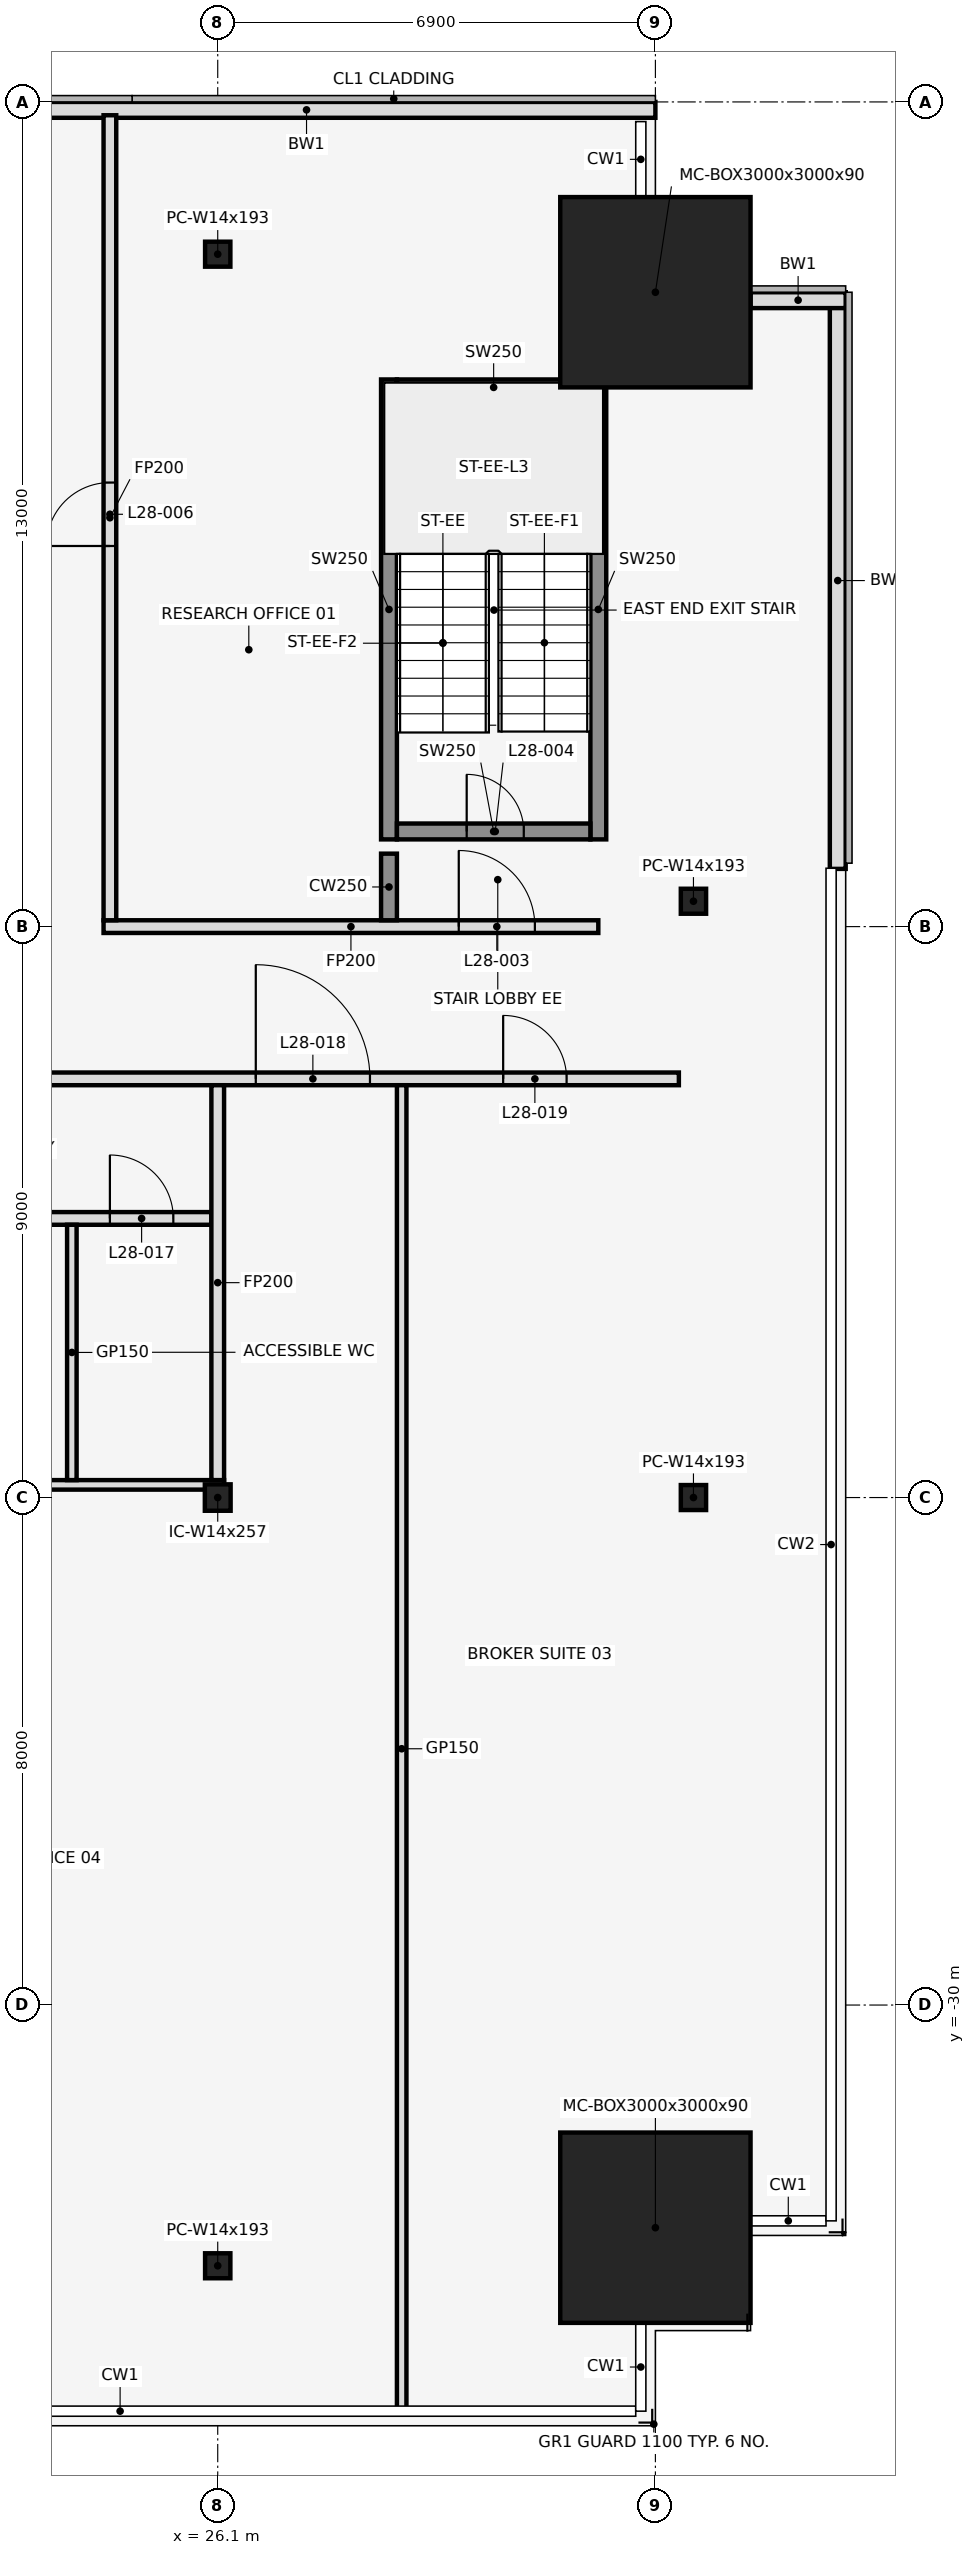
"""IFC4 building model, lengths in metres.
Left out: names, types, materials, properties, quantities, classifications, styles, units other than length and angle.
Written with IfcOpenShell. Run it as: python <this file> out.ifc"""

import sys

from ifc_helpers import new_model, si_unit, direction, frame, frame_2d, origin, origin_2d, place, context, subcontext, project, spatial, rectangle, hollow_rectangle, i_section, extrude, element, fill, save


model = new_model("IFC4")
c1 = context("Model", 3, precision=1e-05, world=origin(), true_north=direction((0.0, 1.0)))
c2 = subcontext(c1, "Body", "Model", "MODEL_VIEW")
j1 = project(units=[si_unit("LENGTHUNIT", "METRE"), si_unit("PLANEANGLEUNIT", "RADIAN")], contexts=[c1])
p1 = place(None, origin())
s1 = spatial("IfcSite", under=j1, at=p1, CompositionType="ELEMENT")
p2 = place(p1, origin())
s2 = spatial("IfcBuilding", under=s1, at=p2, CompositionType="ELEMENT")
p3 = place(p2, frame((0.0, 0.0, 130.9)))
s3 = spatial("IfcBuildingStorey", under=s2, at=p3, CompositionType="ELEMENT", Elevation=130.9)
for number, where, z_axis, x_axis in (
    (1, (26.1, -34.11, 0.0), (0.0, 0.0, 1.0), (1.0, 0.0, 0.0)),
    (2, (26.1, -2.4, 0.0), (0.0, 0.0, 1.0), (1.0, 0.0, 0.0)),
):
    element("IfcColumn", number, at=place(p3, frame(where, z_axis=z_axis, x_axis=x_axis)), inside=s3, PredefinedType="COLUMN", context=c2, shape_type="SweptSolid", body=[
        extrude(i_section(OverallWidth=0.399, OverallDepth=0.394, WebThickness=0.023, FlangeThickness=0.037, at=origin_2d()), origin(), (0.0, 0.0, 1.0), 4.1),
    ])
for number, where, z_axis, x_axis in (
    (3, (33.0, -33.51, 0.0), (0.0, 0.0, 1.0), (1.0, 0.0, 0.0)),
    (4, (33.0, -3.0, 0.0), (0.0, 0.0, 1.0), (1.0, 0.0, 0.0)),
):
    element("IfcColumn", number, at=place(p3, frame(where, z_axis=z_axis, x_axis=x_axis)), inside=s3, PredefinedType="COLUMN", context=c2, shape_type="SweptSolid", body=[
        extrude(hollow_rectangle(XDim=3.0, YDim=3.0, WallThickness=0.09, at=origin_2d()), origin(), (0.0, 0.0, 1.0), 4.1),
    ])
for number, where, z_axis, x_axis in (
    (5, (33.6, -12.6, 0.0), (0.0, 0.0, 1.0), (1.0, 0.0, 0.0)),
    (6, (33.6, -22.0, 0.0), (0.0, 0.0, 1.0), (1.0, 0.0, 0.0)),
):
    element("IfcColumn", number, at=place(p3, frame(where, z_axis=z_axis, x_axis=x_axis)), inside=s3, PredefinedType="COLUMN", context=c2, shape_type="SweptSolid", body=[
        extrude(i_section(OverallWidth=0.399, OverallDepth=0.394, WebThickness=0.023, FlangeThickness=0.037, at=origin_2d()), origin(), (0.0, 0.0, 1.0), 4.1),
    ])
p4 = place(p3, frame((26.1, -22.0, 0.0), z_axis=(0.0, 0.0, 1.0), x_axis=(1.0, 0.0, 0.0)))
e7 = element("IfcColumn", 7, at=p4, inside=s3, PredefinedType="COLUMN", context=c2, shape_type="SweptSolid", body=[
    extrude(i_section(OverallWidth=0.406, OverallDepth=0.417, WebThickness=0.03, FlangeThickness=0.048, at=origin_2d()), origin(), (0.0, 0.0, 1.0), 4.1),
])
p5 = place(p3, frame((33.0, -0.125, 0.0), z_axis=(0.0, 0.0, 1.0), x_axis=(-1.0, 0.0, 0.0)))
e8 = element("IfcWall", 8, at=p5, inside=s3, PredefinedType="STANDARD", context=c2, shape_type="SweptSolid", body=[
    extrude(rectangle(XDim=11.0, YDim=0.25, at=frame_2d((5.5, 0.0))), origin(), (0.0, 0.0, 1.0), 3.9),
])
p6 = place(p3, frame((35.875, -12.09, 0.0), z_axis=(0.0, 0.0, 1.0), x_axis=(0.0, 1.0, 0.0)))
e9 = element("IfcWall", 9, at=p6, inside=s3, PredefinedType="STANDARD", context=c2, shape_type="SweptSolid", body=[
    extrude(rectangle(XDim=9.09, YDim=0.25, at=frame_2d((4.545, 0.0))), origin(), (0.0, 0.0, 1.0), 3.9),
])
p7 = place(p3, frame((36.0, -3.125, 0.0), z_axis=(0.0, 0.0, 1.0), x_axis=(-1.0, 0.0, 0.0)))
e10 = element("IfcWall", 10, at=p7, inside=s3, PredefinedType="STANDARD", context=c2, shape_type="SweptSolid", body=[
    extrude(rectangle(XDim=1.5, YDim=0.25, at=frame_2d((0.75, 0.0))), origin(), (0.0, 0.0, 1.0), 3.9),
])
for number, where, z_axis, x_axis in (
    (11, (28.8, -11.625, 0.0), (0.0, 0.0, 1.0), (0.0, 1.0, 0.0)),
    (12, (32.1, -11.625, 0.0), (0.0, 0.0, 1.0), (0.0, 1.0, 0.0)),
):
    element("IfcWall", number, at=place(p3, frame(where, z_axis=z_axis, x_axis=x_axis)), inside=s3, PredefinedType="SHEAR", context=c2, shape_type="SweptSolid", body=[
        extrude(rectangle(XDim=7.25, YDim=0.25, at=frame_2d((3.625, 0.0))), origin(), (0.0, 0.0, 1.0), 4.1),
    ])
p8 = place(p3, frame((28.925, -11.5, 0.0), z_axis=(0.0, 0.0, 1.0), x_axis=(1.0, 0.0, 0.0)))
e13 = element("IfcWall", 13, at=p8, inside=s3, PredefinedType="SHEAR", context=c2, shape_type="SweptSolid", body=[
    extrude(rectangle(XDim=3.05, YDim=0.25, at=frame_2d((1.525, 0.0))), origin(), (0.0, 0.0, 1.0), 4.1),
])
p9 = place(p8, frame((1.1, 0.0, 0.0)))
e14 = element("IfcOpeningElement", 14, at=p9, cuts=e13, PredefinedType="OPENING", context=c2, shape_type="SweptSolid", body=[
    extrude(rectangle(XDim=0.9, YDim=2.1, at=frame_2d((0.45, 1.05))), frame((0.0, 0.137, 0.0), z_axis=(0.0, -1.0, 0.0), x_axis=(1.0, 0.0, 0.0)), (0.0, 0.0, 1.0), 0.274),
])
p10 = place(p3, frame((28.925, -4.5, 0.0), z_axis=(0.0, 0.0, 1.0), x_axis=(1.0, 0.0, 0.0)))
e15 = element("IfcWall", 15, at=p10, inside=s3, PredefinedType="SHEAR", context=c2, shape_type="SweptSolid", body=[
    extrude(rectangle(XDim=3.05, YDim=0.25, at=frame_2d((1.525, 0.0))), origin(), (0.0, 0.0, 1.0), 4.1),
])
p11 = place(p3, frame((17.5, -21.8, 0.0), z_axis=(0.0, 0.0, 1.0), x_axis=(1.0, 0.0, 0.0)))
e16 = element("IfcWall", 16, at=p11, inside=s3, PredefinedType="PARTITIONING", context=c2, shape_type="SweptSolid", body=[
    extrude(rectangle(XDim=8.7, YDim=0.15, at=frame_2d((4.35, 0.0))), origin(), (0.0, 0.0, 1.0), 2.968),
])
p12 = place(p3, frame((17.5, -17.6, 0.0), z_axis=(0.0, 0.0, 1.0), x_axis=(1.0, 0.0, 0.0)))
e17 = element("IfcWall", 17, at=p12, inside=s3, PredefinedType="PARTITIONING", context=c2, shape_type="SweptSolid", body=[
    extrude(rectangle(XDim=8.5, YDim=0.2, at=frame_2d((4.25, 0.0))), origin(), (0.0, 0.0, 1.0), 2.968),
])
p13 = place(p12, frame((1.1, 0.0, 0.0)))
e18 = element("IfcOpeningElement", 18, at=p13, cuts=e17, PredefinedType="OPENING", context=c2, shape_type="SweptSolid", body=[
    extrude(rectangle(XDim=0.9, YDim=2.1, at=frame_2d((0.45, 1.05))), frame((0.0, 0.112, 0.0), z_axis=(0.0, -1.0, 0.0), x_axis=(1.0, 0.0, 0.0)), (0.0, 0.0, 1.0), 0.224),
])
p14 = place(p12, frame((4.3, 0.0, 0.0)))
e19 = element("IfcOpeningElement", 19, at=p14, cuts=e17, PredefinedType="OPENING", context=c2, shape_type="SweptSolid", body=[
    extrude(rectangle(XDim=0.9, YDim=2.1, at=frame_2d((0.45, 1.05))), frame((0.0, 0.112, 0.0), z_axis=(0.0, -1.0, 0.0), x_axis=(1.0, 0.0, 0.0)), (0.0, 0.0, 1.0), 0.224),
])
p15 = place(p12, frame((6.9, 0.0, 0.0)))
e20 = element("IfcOpeningElement", 20, at=p15, cuts=e17, PredefinedType="OPENING", context=c2, shape_type="SweptSolid", body=[
    extrude(rectangle(XDim=1.0, YDim=2.1, at=frame_2d((0.5, 1.05))), frame((0.0, 0.112, 0.0), z_axis=(0.0, -1.0, 0.0), x_axis=(1.0, 0.0, 0.0)), (0.0, 0.0, 1.0), 0.224),
])
p16 = place(p3, frame((-33.37, -15.4, 0.0), z_axis=(0.0, 0.0, 1.0), x_axis=(1.0, 0.0, 0.0)))
e21 = element("IfcWall", 21, at=p16, inside=s3, PredefinedType="PARTITIONING", context=c2, shape_type="SweptSolid", body=[
    extrude(rectangle(XDim=66.74, YDim=0.2, at=frame_2d((33.37, 0.0))), origin(), (0.0, 0.0, 1.0), 2.968),
])
p17 = place(p16, frame((1.7, 0.0, 0.0)))
e22 = element("IfcOpeningElement", 22, at=p17, cuts=e21, PredefinedType="OPENING", context=c2, shape_type="SweptSolid", body=[
    extrude(rectangle(XDim=1.0, YDim=2.1, at=frame_2d((0.5, 1.05))), frame((0.0, 0.112, 0.0), z_axis=(0.0, -1.0, 0.0), x_axis=(1.0, 0.0, 0.0)), (0.0, 0.0, 1.0), 0.224),
])
p18 = place(p16, frame((7.87, 0.0, 0.0)))
e23 = element("IfcOpeningElement", 23, at=p18, cuts=e21, PredefinedType="OPENING", context=c2, shape_type="SweptSolid", body=[
    extrude(rectangle(XDim=1.8, YDim=2.1, at=frame_2d((0.9, 1.05))), frame((0.0, 0.112, 0.0), z_axis=(0.0, -1.0, 0.0), x_axis=(1.0, 0.0, 0.0)), (0.0, 0.0, 1.0), 0.224),
])
p19 = place(p16, frame((15.07, 0.0, 0.0)))
e24 = element("IfcOpeningElement", 24, at=p19, cuts=e21, PredefinedType="OPENING", context=c2, shape_type="SweptSolid", body=[
    extrude(rectangle(XDim=1.8, YDim=2.1, at=frame_2d((0.9, 1.05))), frame((0.0, 0.112, 0.0), z_axis=(0.0, -1.0, 0.0), x_axis=(1.0, 0.0, 0.0)), (0.0, 0.0, 1.0), 0.224),
])
p20 = place(p16, frame((22.27, 0.0, 0.0)))
e25 = element("IfcOpeningElement", 25, at=p20, cuts=e21, PredefinedType="OPENING", context=c2, shape_type="SweptSolid", body=[
    extrude(rectangle(XDim=1.8, YDim=2.1, at=frame_2d((0.9, 1.05))), frame((0.0, 0.112, 0.0), z_axis=(0.0, -1.0, 0.0), x_axis=(1.0, 0.0, 0.0)), (0.0, 0.0, 1.0), 0.224),
])
p21 = place(p16, frame((30.97, 0.0, 0.0)))
e26 = element("IfcOpeningElement", 26, at=p21, cuts=e21, PredefinedType="OPENING", context=c2, shape_type="SweptSolid", body=[
    extrude(rectangle(XDim=1.8, YDim=2.1, at=frame_2d((0.9, 1.05))), frame((0.0, 0.112, 0.0), z_axis=(0.0, -1.0, 0.0), x_axis=(1.0, 0.0, 0.0)), (0.0, 0.0, 1.0), 0.224),
])
p22 = place(p16, frame((39.67, 0.0, 0.0)))
e27 = element("IfcOpeningElement", 27, at=p22, cuts=e21, PredefinedType="OPENING", context=c2, shape_type="SweptSolid", body=[
    extrude(rectangle(XDim=1.8, YDim=2.1, at=frame_2d((0.9, 1.05))), frame((0.0, 0.112, 0.0), z_axis=(0.0, -1.0, 0.0), x_axis=(1.0, 0.0, 0.0)), (0.0, 0.0, 1.0), 0.224),
])
p23 = place(p16, frame((46.97, 0.0, 0.0)))
e28 = element("IfcOpeningElement", 28, at=p23, cuts=e21, PredefinedType="OPENING", context=c2, shape_type="SweptSolid", body=[
    extrude(rectangle(XDim=1.8, YDim=2.1, at=frame_2d((0.9, 1.05))), frame((0.0, 0.112, 0.0), z_axis=(0.0, -1.0, 0.0), x_axis=(1.0, 0.0, 0.0)), (0.0, 0.0, 1.0), 0.224),
])
p24 = place(p16, frame((54.67, 0.0, 0.0)))
e29 = element("IfcOpeningElement", 29, at=p24, cuts=e21, PredefinedType="OPENING", context=c2, shape_type="SweptSolid", body=[
    extrude(rectangle(XDim=0.9, YDim=2.1, at=frame_2d((0.45, 1.05))), frame((0.0, 0.112, 0.0), z_axis=(0.0, -1.0, 0.0), x_axis=(1.0, 0.0, 0.0)), (0.0, 0.0, 1.0), 0.224),
])
p25 = place(p16, frame((60.07, 0.0, 0.0)))
e30 = element("IfcOpeningElement", 30, at=p25, cuts=e21, PredefinedType="OPENING", context=c2, shape_type="SweptSolid", body=[
    extrude(rectangle(XDim=1.8, YDim=2.1, at=frame_2d((0.9, 1.05))), frame((0.0, 0.112, 0.0), z_axis=(0.0, -1.0, 0.0), x_axis=(1.0, 0.0, 0.0)), (0.0, 0.0, 1.0), 0.224),
])
p26 = place(p16, frame((63.97, 0.0, 0.0)))
e31 = element("IfcOpeningElement", 31, at=p26, cuts=e21, PredefinedType="OPENING", context=c2, shape_type="SweptSolid", body=[
    extrude(rectangle(XDim=1.0, YDim=2.1, at=frame_2d((0.5, 1.05))), frame((0.0, 0.112, 0.0), z_axis=(0.0, -1.0, 0.0), x_axis=(1.0, 0.0, 0.0)), (0.0, 0.0, 1.0), 0.224),
])
p27 = place(p3, frame((24.3, -13.0, 0.0), z_axis=(0.0, 0.0, 1.0), x_axis=(1.0, 0.0, 0.0)))
e32 = element("IfcWall", 32, at=p27, inside=s3, PredefinedType="PARTITIONING", context=c2, shape_type="SweptSolid", body=[
    extrude(rectangle(XDim=7.8, YDim=0.2, at=frame_2d((3.9, 0.0))), origin(), (0.0, 0.0, 1.0), 2.968),
])
p28 = place(p27, frame((5.6, 0.0, 0.0)))
e33 = element("IfcOpeningElement", 33, at=p28, cuts=e32, PredefinedType="OPENING", context=c2, shape_type="SweptSolid", body=[
    extrude(rectangle(XDim=1.2, YDim=2.1, at=frame_2d((0.6, 1.05))), frame((0.0, 0.112, 0.0), z_axis=(0.0, -1.0, 0.0), x_axis=(1.0, 0.0, 0.0)), (0.0, 0.0, 1.0), 0.224),
])
p29 = place(p3, frame((23.8, -21.725, 0.0), z_axis=(0.0, 0.0, 1.0), x_axis=(0.0, 1.0, 0.0)))
e34 = element("IfcWall", 34, at=p29, inside=s3, PredefinedType="PARTITIONING", context=c2, shape_type="SweptSolid", body=[
    extrude(rectangle(XDim=4.025, YDim=0.15, at=frame_2d((2.013, 0.0))), origin(), (0.0, 0.0, 1.0), 2.968),
])
p30 = place(p3, frame((24.4, -12.9, 0.0), z_axis=(0.0, 0.0, 1.0), x_axis=(0.0, 1.0, 0.0)))
e35 = element("IfcWall", 35, at=p30, inside=s3, PredefinedType="PARTITIONING", context=c2, shape_type="SweptSolid", body=[
    extrude(rectangle(XDim=12.69, YDim=0.2, at=frame_2d((6.345, 0.0))), origin(), (0.0, 0.0, 1.0), 2.968),
])
p31 = place(p30, frame((5.9, 0.0, 0.0)))
e36 = element("IfcOpeningElement", 36, at=p31, cuts=e35, PredefinedType="OPENING", context=c2, shape_type="SweptSolid", body=[
    extrude(rectangle(XDim=1.0, YDim=2.1, at=frame_2d((0.5, 1.05))), frame((0.0, 0.112, 0.0), z_axis=(0.0, -1.0, 0.0), x_axis=(1.0, 0.0, 0.0)), (0.0, 0.0, 1.0), 0.224),
])
p32 = place(p3, frame((26.1, -21.725, 0.0), z_axis=(0.0, 0.0, 1.0), x_axis=(0.0, 1.0, 0.0)))
e37 = element("IfcWall", 37, at=p32, inside=s3, PredefinedType="PARTITIONING", context=c2, shape_type="SweptSolid", body=[
    extrude(rectangle(XDim=6.225, YDim=0.2, at=frame_2d((3.113, 0.0))), origin(), (0.0, 0.0, 1.0), 2.968),
])
p33 = place(p3, frame((28.8, -12.9, 0.0), z_axis=(0.0, 0.0, 1.0), x_axis=(0.0, 1.0, 0.0)))
e38 = element("IfcWall", 38, at=p33, inside=s3, PredefinedType="SHEAR", context=c2, shape_type="SweptSolid", body=[
    extrude(rectangle(XDim=1.05, YDim=0.25, at=frame_2d((0.525, 0.0))), origin(), (0.0, 0.0, 1.0), 4.1),
])
p34 = place(p3, frame((29.0, -36.42, 0.0), z_axis=(0.0, 0.0, 1.0), x_axis=(0.0, 1.0, 0.0)))
e39 = element("IfcWall", 39, at=p34, inside=s3, PredefinedType="PARTITIONING", context=c2, shape_type="SweptSolid", body=[
    extrude(rectangle(XDim=20.92, YDim=0.15, at=frame_2d((10.46, 0.0))), origin(), (0.0, 0.0, 1.0), 2.968),
])
p35 = place(p28, origin())
e40 = element("IfcDoor", 40, at=p35, inside=s3, OperationType="SINGLE_SWING_RIGHT", PredefinedType="DOOR", context=c2, shape_type="SweptSolid", body=[
    extrude(rectangle(XDim=1.2, YDim=2.1, at=frame_2d((0.6, 1.05))), frame((0.0, 0.025, 0.0), z_axis=(0.0, -1.0, 0.0), x_axis=(1.0, 0.0, 0.0)), (0.0, 0.0, 1.0), 0.05),
])
fill(e33, e40)
p36 = place(p9, origin())
e41 = element("IfcDoor", 41, at=p36, inside=s3, OperationType="SINGLE_SWING_LEFT", PredefinedType="DOOR", context=c2, shape_type="SweptSolid", body=[
    extrude(rectangle(XDim=0.9, YDim=2.1, at=frame_2d((0.45, 1.05))), frame((0.0, 0.025, 0.0), z_axis=(0.0, -1.0, 0.0), x_axis=(1.0, 0.0, 0.0)), (0.0, 0.0, 1.0), 0.05),
])
fill(e14, e41)
p37 = place(p31, frame((1.0, 0.0, 0.0), z_axis=(0.0, 0.0, 1.0), x_axis=(-1.0, 0.0, 0.0)))
e42 = element("IfcDoor", 42, at=p37, inside=s3, OperationType="SINGLE_SWING_RIGHT", PredefinedType="DOOR", context=c2, shape_type="SweptSolid", body=[
    extrude(rectangle(XDim=1.0, YDim=2.1, at=frame_2d((0.5, 1.05))), frame((0.0, 0.025, 0.0), z_axis=(0.0, -1.0, 0.0), x_axis=(1.0, 0.0, 0.0)), (0.0, 0.0, 1.0), 0.05),
])
fill(e36, e42)
p38 = place(p15, frame((1.0, 0.0, 0.0), z_axis=(0.0, 0.0, 1.0), x_axis=(-1.0, 0.0, 0.0)))
e43 = element("IfcDoor", 43, at=p38, inside=s3, OperationType="SINGLE_SWING_RIGHT", PredefinedType="DOOR", context=c2, shape_type="SweptSolid", body=[
    extrude(rectangle(XDim=1.0, YDim=2.1, at=frame_2d((0.5, 1.05))), frame((0.0, 0.025, 0.0), z_axis=(0.0, -1.0, 0.0), x_axis=(1.0, 0.0, 0.0)), (0.0, 0.0, 1.0), 0.05),
])
fill(e20, e43)
p39 = place(p25, origin())
e44 = element("IfcDoor", 44, at=p39, inside=s3, OperationType="SINGLE_SWING_LEFT", PredefinedType="DOOR", context=c2, shape_type="SweptSolid", body=[
    extrude(rectangle(XDim=1.8, YDim=2.1, at=frame_2d((0.9, 1.05))), frame((0.0, 0.025, 0.0), z_axis=(0.0, -1.0, 0.0), x_axis=(1.0, 0.0, 0.0)), (0.0, 0.0, 1.0), 0.05),
])
fill(e30, e44)
p40 = place(p26, frame((1.0, 0.0, 0.0), z_axis=(0.0, 0.0, 1.0), x_axis=(-1.0, 0.0, 0.0)))
e45 = element("IfcDoor", 45, at=p40, inside=s3, OperationType="SINGLE_SWING_LEFT", PredefinedType="DOOR", context=c2, shape_type="SweptSolid", body=[
    extrude(rectangle(XDim=1.0, YDim=2.1, at=frame_2d((0.5, 1.05))), frame((0.0, 0.025, 0.0), z_axis=(0.0, -1.0, 0.0), x_axis=(1.0, 0.0, 0.0)), (0.0, 0.0, 1.0), 0.05),
])
fill(e31, e45)
save(model, sys.argv[1])
